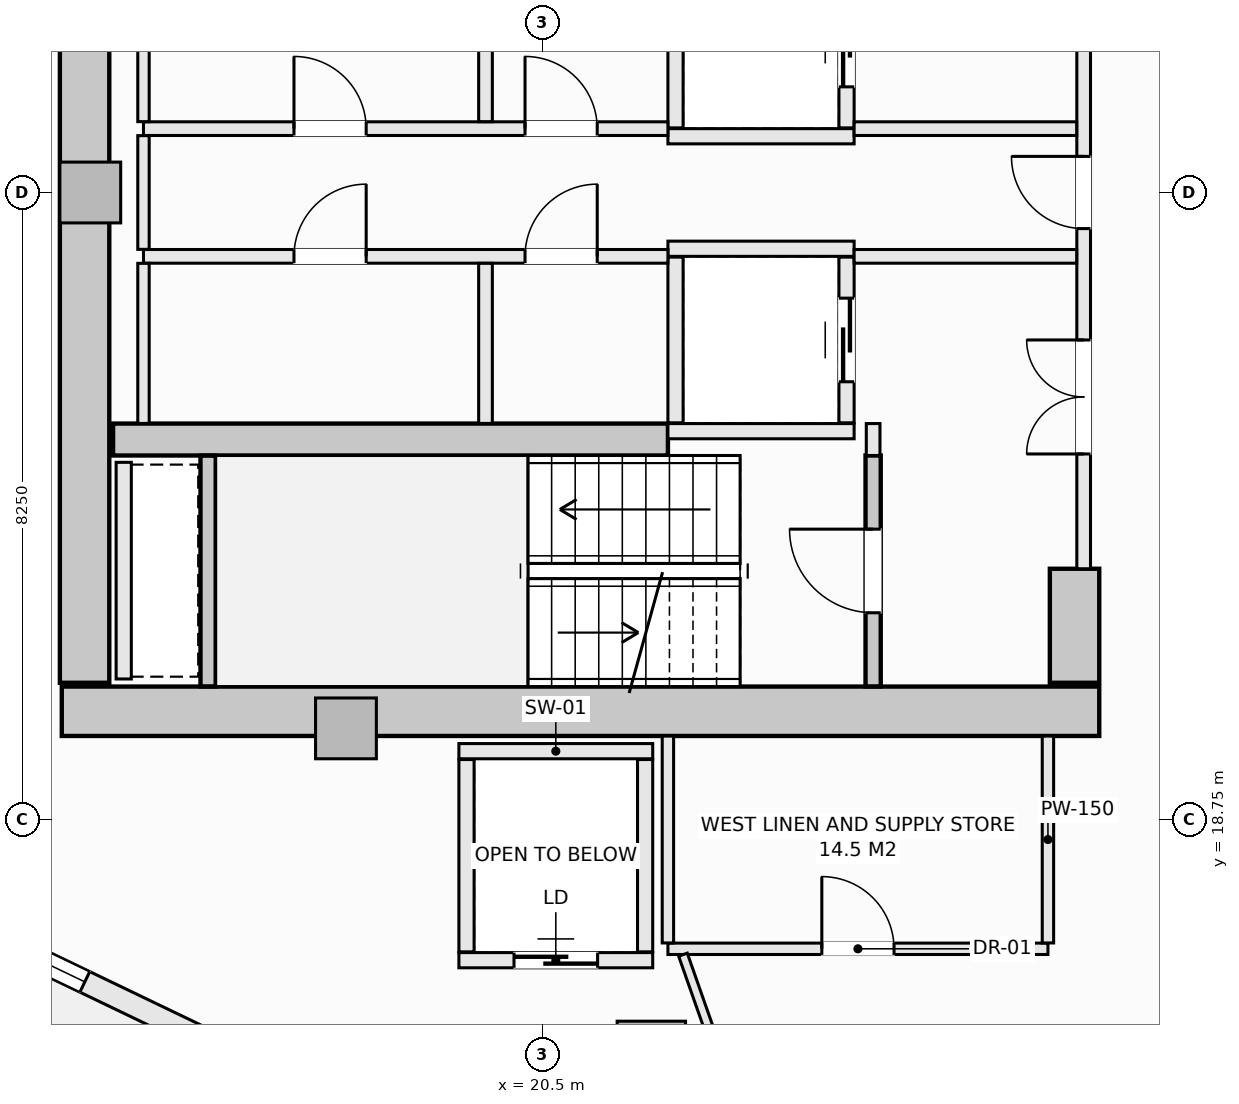
"""IFC4 building model, lengths in metres.
Left out: names, types, materials, properties, quantities, classifications, styles, units other than length and angle.
Written with IfcOpenShell. Run it as: python <this file> out.ifc"""

import sys

from ifc_helpers import new_model, si_unit, direction, frame, frame_2d, origin, origin_2d, place, context, subcontext, project, spatial, rectangle, extrude, element, fill, save


model = new_model("IFC4")
c1 = context("Model", 3, precision=1e-05, world=origin(), true_north=direction((0.0, 1.0)))
c2 = subcontext(c1, "Body", "Model", "MODEL_VIEW")
j1 = project(units=[si_unit("LENGTHUNIT", "METRE"), si_unit("PLANEANGLEUNIT", "RADIAN")], contexts=[c1])
p1 = place(None, origin())
s1 = spatial("IfcSite", under=j1, at=p1, CompositionType="ELEMENT")
p2 = place(p1, origin())
s2 = spatial("IfcBuilding", under=s1, at=p2, CompositionType="ELEMENT")
p3 = place(p2, frame((0.0, 0.0, 142.7)))
s3 = spatial("IfcBuildingStorey", under=s2, at=p3, CompositionType="ELEMENT", Elevation=142.7)
p4 = place(p3, frame((14.175, 20.175, -0.27), z_axis=(0.0, 0.0, 1.0), x_axis=(1.0, 0.0, 0.0)))
e1 = element("IfcWall", 1, at=p4, inside=s3, PredefinedType="SHEAR", context=c2, shape_type="SweptSolid", body=[
    extrude(rectangle(XDim=13.65, YDim=0.65, at=frame_2d((6.825, 0.0))), origin(), (0.0, 0.0, 1.0), 3.4),
])
p5 = place(p3, frame((14.475, 20.55, -0.27), z_axis=(0.0, 0.0, 1.0), x_axis=(0.0, 1.0, 0.0)))
e2 = element("IfcWall", 2, at=p5, inside=s3, PredefinedType="SHEAR", context=c2, shape_type="SweptSolid", body=[
    extrude(rectangle(XDim=12.9, YDim=0.65, at=frame_2d((6.45, 0.0))), origin(), (0.0, 0.0, 1.0), 3.4),
])
p6 = place(p3, frame((27.5, 20.55, -0.27), z_axis=(0.0, 0.0, 1.0), x_axis=(0.0, 1.0, 0.0)))
e3 = element("IfcWall", 3, at=p6, inside=s3, PredefinedType="SHEAR", context=c2, shape_type="SweptSolid", body=[
    extrude(rectangle(XDim=1.5, YDim=0.65, at=frame_2d((0.75, 0.0))), origin(), (0.0, 0.0, 1.0), 3.4),
])
p7 = place(p3, frame((14.85, 23.75, -0.27), z_axis=(0.0, 0.0, 1.0), x_axis=(1.0, 0.0, 0.0)))
e4 = element("IfcWall", 4, at=p7, inside=s3, PredefinedType="SHEAR", context=c2, shape_type="SweptSolid", body=[
    extrude(rectangle(XDim=7.3, YDim=0.42, at=frame_2d((3.65, 0.0))), origin(), (0.0, 0.0, 1.0), 3.4),
])
p8 = place(p3, frame((21.932, 15.648, -0.27), z_axis=(0.0, 0.0, 1.0), x_axis=(1.0, 0.0, 0.0)))
e5 = element("IfcColumn", 5, at=p8, inside=s3, PredefinedType="COLUMN", context=c2, shape_type="SweptSolid", body=[
    extrude(rectangle(XDim=0.9, YDim=0.9, at=origin_2d()), origin(), (0.0, 0.0, 1.0), 3.4),
])
for number, where, z_axis, x_axis in (
    (6, (14.55, 27.0, -0.27), (0.0, 0.0, 1.0), (1.0, 0.0, 0.0)),
    (7, (17.914, 19.95, -0.27), (0.0, 0.0, 1.0), (1.0, 0.0, 0.0)),
):
    element("IfcColumn", number, at=place(p3, frame(where, z_axis=z_axis, x_axis=x_axis)), inside=s3, PredefinedType="PILASTER", context=c2, shape_type="SweptSolid", body=[
        extrude(rectangle(XDim=0.8, YDim=0.8, at=origin_2d()), origin(), (0.0, 0.0, 1.0), 3.4),
    ])
p9 = place(p3, frame((11.127, 18.225, 0.0), z_axis=(0.0, 0.0, 1.0), x_axis=(0.901353070301, -0.433085029363, 0.0)))
e8 = element("IfcWall", 8, at=p9, inside=s3, PredefinedType="SOLIDWALL", context=c2, shape_type="SweptSolid", body=[
    extrude(rectangle(XDim=5.336, YDim=0.3, at=frame_2d((2.668, 0.0))), origin(), (0.0, 0.0, 1.0), 2.653),
])
p10 = place(p9, frame((1.618, 0.0, 0.74)))
e9 = element("IfcOpeningElement", 9, at=p10, cuts=e8, PredefinedType="OPENING", context=c2, shape_type="SweptSolid", body=[
    extrude(rectangle(XDim=2.1, YDim=1.7, at=frame_2d((1.05, 0.85))), frame((0.0, 0.16, 0.0), z_axis=(0.0, -1.0, 0.0), x_axis=(1.0, 0.0, 0.0)), (0.0, 0.0, 1.0), 0.32),
])
p11 = place(p3, frame((24.85, 20.502, -0.27), z_axis=(0.0, 0.0, 1.0), x_axis=(0.0, 1.0, 0.0)))
e10 = element("IfcWall", 10, at=p11, inside=s3, PredefinedType="SHEAR", context=c2, shape_type="SweptSolid", body=[
    extrude(rectangle(XDim=3.038, YDim=0.2, at=frame_2d((1.519, 0.0))), origin(), (0.0, 0.0, 1.0), 3.4),
])
p12 = place(p11, frame((0.969, 0.0, 0.27)))
e11 = element("IfcOpeningElement", 11, at=p12, cuts=e10, PredefinedType="OPENING", context=c2, shape_type="SweptSolid", body=[
    extrude(rectangle(XDim=1.1, YDim=2.15, at=frame_2d((0.55, 1.075))), frame((0.0, 0.11, 0.0), z_axis=(0.0, -1.0, 0.0), x_axis=(1.0, 0.0, 0.0)), (0.0, 0.0, 1.0), 0.22),
])
p13 = place(p3, frame((16.1, 20.502, -0.27), z_axis=(0.0, 0.0, 1.0), x_axis=(0.0, 1.0, 0.0)))
e12 = element("IfcWall", 12, at=p13, inside=s3, PredefinedType="SHEAR", context=c2, shape_type="SweptSolid", body=[
    extrude(rectangle(XDim=3.036, YDim=0.2, at=frame_2d((1.518, 0.0))), origin(), (0.0, 0.0, 1.0), 3.4),
])
p14 = place(p3, frame((22.15, 27.74, 0.0), z_axis=(0.0, 0.0, 1.0), x_axis=(1.0, 0.0, 0.0)))
e13 = element("IfcWall", 13, at=p14, inside=s3, PredefinedType="SOLIDWALL", context=c2, shape_type="SweptSolid", body=[
    extrude(rectangle(XDim=2.45, YDim=0.2, at=frame_2d((1.225, 0.0))), origin(), (0.0, 0.0, 1.0), 3.13),
])
p15 = place(p3, frame((22.25, 27.85, 0.0), z_axis=(0.0, 0.0, 1.0), x_axis=(0.0, 1.0, 0.0)))
e14 = element("IfcWall", 14, at=p15, inside=s3, PredefinedType="SOLIDWALL", context=c2, shape_type="SweptSolid", body=[
    extrude(rectangle(XDim=2.18, YDim=0.2, at=frame_2d((1.09, 0.0))), origin(), (0.0, 0.0, 1.0), 3.13),
])
p16 = place(p3, frame((24.5, 27.85, 0.0), z_axis=(0.0, 0.0, 1.0), x_axis=(0.0, 1.0, 0.0)))
e15 = element("IfcWall", 15, at=p16, inside=s3, PredefinedType="SOLIDWALL", context=c2, shape_type="SweptSolid", body=[
    extrude(rectangle(XDim=2.18, YDim=0.2, at=frame_2d((1.09, 0.0))), origin(), (0.0, 0.0, 1.0), 3.13),
])
p17 = place(p16, frame((0.54, 0.0, 0.0)))
e16 = element("IfcOpeningElement", 16, at=p17, cuts=e15, PredefinedType="OPENING", context=c2, shape_type="SweptSolid", body=[
    extrude(rectangle(XDim=1.1, YDim=2.2, at=frame_2d((0.55, 1.1))), frame((0.0, 0.11, 0.0), z_axis=(0.0, -1.0, 0.0), x_axis=(1.0, 0.0, 0.0)), (0.0, 0.0, 1.0), 0.22),
])
for number, where, z_axis, x_axis in (
    (17, (22.15, 26.26, 0.0), (0.0, 0.0, 1.0), (1.0, 0.0, 0.0)),
    (18, (22.15, 23.86, 0.0), (0.0, 0.0, 1.0), (1.0, 0.0, 0.0)),
):
    element("IfcWall", number, at=place(p3, frame(where, z_axis=z_axis, x_axis=x_axis)), inside=s3, PredefinedType="SOLIDWALL", context=c2, shape_type="SweptSolid", body=[
        extrude(rectangle(XDim=2.45, YDim=0.2, at=frame_2d((1.225, 0.0))), origin(), (0.0, 0.0, 1.0), 3.13),
    ])
p18 = place(p3, frame((22.25, 23.97, 0.0), z_axis=(0.0, 0.0, 1.0), x_axis=(0.0, 1.0, 0.0)))
e19 = element("IfcWall", 19, at=p18, inside=s3, PredefinedType="SOLIDWALL", context=c2, shape_type="SweptSolid", body=[
    extrude(rectangle(XDim=2.18, YDim=0.2, at=frame_2d((1.09, 0.0))), origin(), (0.0, 0.0, 1.0), 3.13),
])
p19 = place(p3, frame((24.5, 23.97, 0.0), z_axis=(0.0, 0.0, 1.0), x_axis=(0.0, 1.0, 0.0)))
e20 = element("IfcWall", 20, at=p19, inside=s3, PredefinedType="SOLIDWALL", context=c2, shape_type="SweptSolid", body=[
    extrude(rectangle(XDim=2.18, YDim=0.2, at=frame_2d((1.09, 0.0))), origin(), (0.0, 0.0, 1.0), 3.13),
])
p20 = place(p19, frame((0.54, 0.0, 0.0)))
e21 = element("IfcOpeningElement", 21, at=p20, cuts=e20, PredefinedType="OPENING", context=c2, shape_type="SweptSolid", body=[
    extrude(rectangle(XDim=1.1, YDim=2.2, at=frame_2d((0.55, 1.1))), frame((0.0, 0.11, 0.0), z_axis=(0.0, -1.0, 0.0), x_axis=(1.0, 0.0, 0.0)), (0.0, 0.0, 1.0), 0.22),
])
p21 = place(p3, frame((19.4, 19.65, 0.0), z_axis=(0.0, 0.0, 1.0), x_axis=(1.0, 0.0, 0.0)))
e22 = element("IfcWall", 22, at=p21, inside=s3, PredefinedType="SOLIDWALL", context=c2, shape_type="SweptSolid", body=[
    extrude(rectangle(XDim=2.55, YDim=0.2, at=frame_2d((1.275, 0.0))), origin(), (0.0, 0.0, 1.0), 3.13),
])
p22 = place(p3, frame((19.4, 16.9, 0.0), z_axis=(0.0, 0.0, 1.0), x_axis=(1.0, 0.0, 0.0)))
e23 = element("IfcWall", 23, at=p22, inside=s3, PredefinedType="SOLIDWALL", context=c2, shape_type="SweptSolid", body=[
    extrude(rectangle(XDim=2.55, YDim=0.2, at=frame_2d((1.275, 0.0))), origin(), (0.0, 0.0, 1.0), 3.13),
])
p23 = place(p22, frame((0.725, 0.0, 0.0)))
e24 = element("IfcOpeningElement", 24, at=p23, cuts=e23, PredefinedType="OPENING", context=c2, shape_type="SweptSolid", body=[
    extrude(rectangle(XDim=1.1, YDim=2.2, at=frame_2d((0.55, 1.1))), frame((0.0, 0.11, 0.0), z_axis=(0.0, -1.0, 0.0), x_axis=(1.0, 0.0, 0.0)), (0.0, 0.0, 1.0), 0.22),
])
for number, where, z_axis, x_axis in (
    (25, (19.5, 17.01, 0.0), (0.0, 0.0, 1.0), (0.0, 1.0, 0.0)),
    (26, (21.85, 17.01, 0.0), (0.0, 0.0, 1.0), (0.0, 1.0, 0.0)),
):
    element("IfcWall", number, at=place(p3, frame(where, z_axis=z_axis, x_axis=x_axis)), inside=s3, PredefinedType="SOLIDWALL", context=c2, shape_type="SweptSolid", body=[
        extrude(rectangle(XDim=2.53, YDim=0.2, at=frame_2d((1.265, 0.0))), origin(), (0.0, 0.0, 1.0), 3.13),
    ])
p24 = place(p3, frame((14.99, 20.6, 0.0), z_axis=(0.0, 0.0, 1.0), x_axis=(0.0, 1.0, 0.0)))
e27 = element("IfcWall", 27, at=p24, inside=s3, PredefinedType="SOLIDWALL", context=c2, shape_type="SweptSolid", body=[
    extrude(rectangle(XDim=2.85, YDim=0.2, at=frame_2d((1.425, 0.0))), origin(), (0.0, 0.0, 1.0), 3.13),
])
p25 = place(p3, frame((24.85, 23.54, 0.0), z_axis=(0.0, 0.0, 1.0), x_axis=(0.0, 1.0, 0.0)))
e28 = element("IfcWall", 28, at=p25, inside=s3, PredefinedType="SOLIDWALL", context=c2, shape_type="SweptSolid", body=[
    extrude(rectangle(XDim=0.42, YDim=0.18, at=frame_2d((0.21, 0.0))), origin(), (0.0, 0.0, 1.0), 3.13),
])
p26 = place(p3, frame((27.62, 22.05, 0.0), z_axis=(0.0, 0.0, 1.0), x_axis=(0.0, 1.0, 0.0)))
e29 = element("IfcWall", 29, at=p26, inside=s3, PredefinedType="SOLIDWALL", context=c2, shape_type="SweptSolid", body=[
    extrude(rectangle(XDim=9.9, YDim=0.18, at=frame_2d((4.95, 0.0))), origin(), (0.0, 0.0, 1.0), 3.13),
])
p27 = place(p26, frame((4.475, 0.0, 0.0)))
e30 = element("IfcOpeningElement", 30, at=p27, cuts=e29, PredefinedType="OPENING", context=c2, shape_type="SweptSolid", body=[
    extrude(rectangle(XDim=0.95, YDim=2.1, at=frame_2d((0.475, 1.05))), frame((0.0, 0.1, 0.0), z_axis=(0.0, -1.0, 0.0), x_axis=(1.0, 0.0, 0.0)), (0.0, 0.0, 1.0), 0.2),
])
p28 = place(p26, frame((6.89, 0.0, 0.0)))
e31 = element("IfcOpeningElement", 31, at=p28, cuts=e29, PredefinedType="OPENING", context=c2, shape_type="SweptSolid", body=[
    extrude(rectangle(XDim=1.5, YDim=2.2, at=frame_2d((0.75, 1.1))), frame((0.0, 0.1, 0.0), z_axis=(0.0, -1.0, 0.0), x_axis=(1.0, 0.0, 0.0)), (0.0, 0.0, 1.0), 0.2),
])
p29 = place(p26, frame((1.51, 0.0, 0.0)))
e32 = element("IfcOpeningElement", 32, at=p29, cuts=e29, PredefinedType="OPENING", context=c2, shape_type="SweptSolid", body=[
    extrude(rectangle(XDim=1.5, YDim=2.2, at=frame_2d((0.75, 1.1))), frame((0.0, 0.1, 0.0), z_axis=(0.0, -1.0, 0.0), x_axis=(1.0, 0.0, 0.0)), (0.0, 0.0, 1.0), 0.2),
])
p30 = place(p3, frame((15.25, 27.84, 0.0), z_axis=(0.0, 0.0, 1.0), x_axis=(1.0, 0.0, 0.0)))
e33 = element("IfcWall", 33, at=p30, inside=s3, PredefinedType="SOLIDWALL", context=c2, shape_type="SweptSolid", body=[
    extrude(rectangle(XDim=6.9, YDim=0.18, at=frame_2d((3.45, 0.0))), origin(), (0.0, 0.0, 1.0), 3.13),
])
p31 = place(p30, frame((5.02, 0.0, 0.0)))
e34 = element("IfcOpeningElement", 34, at=p31, cuts=e33, PredefinedType="OPENING", context=c2, shape_type="SweptSolid", body=[
    extrude(rectangle(XDim=0.95, YDim=2.1, at=frame_2d((0.475, 1.05))), frame((0.0, 0.1, 0.0), z_axis=(0.0, -1.0, 0.0), x_axis=(1.0, 0.0, 0.0)), (0.0, 0.0, 1.0), 0.2),
])
p32 = place(p30, frame((1.98, 0.0, 0.0)))
e35 = element("IfcOpeningElement", 35, at=p32, cuts=e33, PredefinedType="OPENING", context=c2, shape_type="SweptSolid", body=[
    extrude(rectangle(XDim=0.95, YDim=2.1, at=frame_2d((0.475, 1.05))), frame((0.0, 0.1, 0.0), z_axis=(0.0, -1.0, 0.0), x_axis=(1.0, 0.0, 0.0)), (0.0, 0.0, 1.0), 0.2),
])
p33 = place(p3, frame((24.6, 27.84, 0.0), z_axis=(0.0, 0.0, 1.0), x_axis=(1.0, 0.0, 0.0)))
e36 = element("IfcWall", 36, at=p33, inside=s3, PredefinedType="SOLIDWALL", context=c2, shape_type="SweptSolid", body=[
    extrude(rectangle(XDim=2.928, YDim=0.18, at=frame_2d((1.464, 0.0))), origin(), (0.0, 0.0, 1.0), 3.13),
])
p34 = place(p3, frame((15.25, 26.16, 0.0), z_axis=(0.0, 0.0, 1.0), x_axis=(1.0, 0.0, 0.0)))
e37 = element("IfcWall", 37, at=p34, inside=s3, PredefinedType="SOLIDWALL", context=c2, shape_type="SweptSolid", body=[
    extrude(rectangle(XDim=6.9, YDim=0.18, at=frame_2d((3.45, 0.0))), origin(), (0.0, 0.0, 1.0), 3.13),
])
p35 = place(p34, frame((5.02, 0.0, 0.0)))
e38 = element("IfcOpeningElement", 38, at=p35, cuts=e37, PredefinedType="OPENING", context=c2, shape_type="SweptSolid", body=[
    extrude(rectangle(XDim=0.95, YDim=2.1, at=frame_2d((0.475, 1.05))), frame((0.0, 0.1, 0.0), z_axis=(0.0, -1.0, 0.0), x_axis=(1.0, 0.0, 0.0)), (0.0, 0.0, 1.0), 0.2),
])
p36 = place(p34, frame((1.98, 0.0, 0.0)))
e39 = element("IfcOpeningElement", 39, at=p36, cuts=e37, PredefinedType="OPENING", context=c2, shape_type="SweptSolid", body=[
    extrude(rectangle(XDim=0.95, YDim=2.1, at=frame_2d((0.475, 1.05))), frame((0.0, 0.1, 0.0), z_axis=(0.0, -1.0, 0.0), x_axis=(1.0, 0.0, 0.0)), (0.0, 0.0, 1.0), 0.2),
])
p37 = place(p3, frame((24.6, 26.16, 0.0), z_axis=(0.0, 0.0, 1.0), x_axis=(1.0, 0.0, 0.0)))
e40 = element("IfcWall", 40, at=p37, inside=s3, PredefinedType="SOLIDWALL", context=c2, shape_type="SweptSolid", body=[
    extrude(rectangle(XDim=2.928, YDim=0.18, at=frame_2d((1.464, 0.0))), origin(), (0.0, 0.0, 1.0), 3.13),
])
p38 = place(p3, frame((15.25, 23.962, 0.0), z_axis=(0.0, 0.0, 1.0), x_axis=(0.0, 1.0, 0.0)))
e41 = element("IfcWall", 41, at=p38, inside=s3, PredefinedType="PARTITIONING", context=c2, shape_type="SweptSolid", body=[
    extrude(rectangle(XDim=2.106, YDim=0.15, at=frame_2d((1.053, 0.0))), origin(), (0.0, 0.0, 1.0), 3.13),
])
p39 = place(p3, frame((15.25, 26.252, 0.0), z_axis=(0.0, 0.0, 1.0), x_axis=(0.0, 1.0, 0.0)))
e42 = element("IfcWall", 42, at=p39, inside=s3, PredefinedType="PARTITIONING", context=c2, shape_type="SweptSolid", body=[
    extrude(rectangle(XDim=1.496, YDim=0.15, at=frame_2d((0.748, 0.0))), origin(), (0.0, 0.0, 1.0), 3.13),
])
p40 = place(p3, frame((15.25, 27.932, 0.0), z_axis=(0.0, 0.0, 1.0), x_axis=(0.0, 1.0, 0.0)))
e43 = element("IfcWall", 43, at=p40, inside=s3, PredefinedType="PARTITIONING", context=c2, shape_type="SweptSolid", body=[
    extrude(rectangle(XDim=2.106, YDim=0.15, at=frame_2d((1.053, 0.0))), origin(), (0.0, 0.0, 1.0), 3.13),
])
for number, where, z_axis, x_axis in (
    (44, (19.75, 23.962, 0.0), (0.0, 0.0, 1.0), (0.0, 1.0, 0.0)),
    (45, (19.75, 27.932, 0.0), (0.0, 0.0, 1.0), (0.0, 1.0, 0.0)),
):
    element("IfcWall", number, at=place(p3, frame(where, z_axis=z_axis, x_axis=x_axis)), inside=s3, PredefinedType="SOLIDWALL", context=c2, shape_type="SweptSolid", body=[
        extrude(rectangle(XDim=2.106, YDim=0.18, at=frame_2d((1.053, 0.0))), origin(), (0.0, 0.0, 1.0), 3.13),
    ])
p41 = place(p3, frame((22.15, 17.05, 0.0), z_axis=(0.0, 0.0, 1.0), x_axis=(1.0, 0.0, 0.0)))
e46 = element("IfcWall", 46, at=p41, inside=s3, PredefinedType="PARTITIONING", context=c2, shape_type="SweptSolid", body=[
    extrude(rectangle(XDim=5.0, YDim=0.15, at=frame_2d((2.5, 0.0))), origin(), (0.0, 0.0, 1.0), 3.13),
])
p42 = place(p41, frame((2.025, 0.0, 0.0)))
e47 = element("IfcOpeningElement", 47, at=p42, cuts=e46, PredefinedType="OPENING", context=c2, shape_type="SweptSolid", body=[
    extrude(rectangle(XDim=0.95, YDim=2.1, at=frame_2d((0.475, 1.05))), frame((0.0, 0.085, 0.0), z_axis=(0.0, -1.0, 0.0), x_axis=(1.0, 0.0, 0.0)), (0.0, 0.0, 1.0), 0.17),
])
for number, where, z_axis, x_axis in (
    (48, (22.15, 17.127, 0.0), (0.0, 0.0, 1.0), (0.0, 1.0, 0.0)),
    (49, (27.15, 17.127, 0.0), (0.0, 0.0, 1.0), (0.0, 1.0, 0.0)),
):
    element("IfcWall", number, at=place(p3, frame(where, z_axis=z_axis, x_axis=x_axis)), inside=s3, PredefinedType="PARTITIONING", context=c2, shape_type="SweptSolid", body=[
        extrude(rectangle(XDim=2.721, YDim=0.15, at=frame_2d((1.36, 0.0))), origin(), (0.0, 0.0, 1.0), 3.13),
    ])
p43 = place(p3, frame((22.348, 16.973, 0.0), z_axis=(0.0, 0.0, 1.0), x_axis=(0.331471687044, -0.943465166653, 0.0)))
e50 = element("IfcWall", 50, at=p43, inside=s3, PredefinedType="PARTITIONING", context=c2, shape_type="SweptSolid", body=[
    extrude(rectangle(XDim=1.231, YDim=0.12, at=frame_2d((0.616, 0.0))), origin(), (0.0, 0.0, 1.0), 3.13),
])
p44 = place(p10, origin())
e51 = element("IfcWindow", 51, at=p44, inside=s3, PartitioningType="SINGLE_PANEL", PredefinedType="WINDOW", context=c2, shape_type="SweptSolid", body=[
    extrude(rectangle(XDim=2.1, YDim=1.7, at=frame_2d((1.05, 0.85))), frame((0.0, 0.03, 0.0), z_axis=(0.0, -1.0, 0.0), x_axis=(1.0, 0.0, 0.0)), (0.0, 0.0, 1.0), 0.06),
])
fill(e9, e51)
p45 = place(p12, origin())
e52 = element("IfcDoor", 52, at=p45, inside=s3, OperationType="SINGLE_SWING_RIGHT", PredefinedType="DOOR", context=c2, shape_type="SweptSolid", body=[
    extrude(rectangle(XDim=1.1, YDim=2.15, at=frame_2d((0.55, 1.075))), frame((0.0, 0.025, 0.0), z_axis=(0.0, -1.0, 0.0), x_axis=(1.0, 0.0, 0.0)), (0.0, 0.0, 1.0), 0.05),
])
fill(e11, e52)
p46 = place(p17, origin())
e53 = element("IfcDoor", 53, at=p46, inside=s3, OperationType="SLIDING_TO_LEFT", PredefinedType="DOOR", context=c2, shape_type="SweptSolid", body=[
    extrude(rectangle(XDim=1.1, YDim=2.2, at=frame_2d((0.55, 1.1))), frame((0.0, 0.025, 0.0), z_axis=(0.0, -1.0, 0.0), x_axis=(1.0, 0.0, 0.0)), (0.0, 0.0, 1.0), 0.05),
])
fill(e16, e53)
p47 = place(p20, origin())
e54 = element("IfcDoor", 54, at=p47, inside=s3, OperationType="SLIDING_TO_LEFT", PredefinedType="DOOR", context=c2, shape_type="SweptSolid", body=[
    extrude(rectangle(XDim=1.1, YDim=2.2, at=frame_2d((0.55, 1.1))), frame((0.0, 0.025, 0.0), z_axis=(0.0, -1.0, 0.0), x_axis=(1.0, 0.0, 0.0)), (0.0, 0.0, 1.0), 0.05),
])
fill(e21, e54)
p48 = place(p23, origin())
e55 = element("IfcDoor", 55, at=p48, inside=s3, OperationType="SLIDING_TO_LEFT", PredefinedType="DOOR", context=c2, shape_type="SweptSolid", body=[
    extrude(rectangle(XDim=1.1, YDim=2.2, at=frame_2d((0.55, 1.1))), frame((0.0, 0.025, 0.0), z_axis=(0.0, -1.0, 0.0), x_axis=(1.0, 0.0, 0.0)), (0.0, 0.0, 1.0), 0.05),
])
fill(e24, e55)
p49 = place(p27, origin())
e56 = element("IfcDoor", 56, at=p49, inside=s3, OperationType="SINGLE_SWING_RIGHT", PredefinedType="DOOR", context=c2, shape_type="SweptSolid", body=[
    extrude(rectangle(XDim=0.95, YDim=2.1, at=frame_2d((0.475, 1.05))), frame((0.0, 0.025, 0.0), z_axis=(0.0, -1.0, 0.0), x_axis=(1.0, 0.0, 0.0)), (0.0, 0.0, 1.0), 0.05),
])
fill(e30, e56)
p50 = place(p29, origin())
e57 = element("IfcDoor", 57, at=p50, inside=s3, OperationType="DOUBLE_DOOR_SINGLE_SWING", PredefinedType="DOOR", context=c2, shape_type="SweptSolid", body=[
    extrude(rectangle(XDim=1.5, YDim=2.2, at=frame_2d((0.75, 1.1))), frame((0.0, 0.025, 0.0), z_axis=(0.0, -1.0, 0.0), x_axis=(1.0, 0.0, 0.0)), (0.0, 0.0, 1.0), 0.05),
])
fill(e32, e57)
p51 = place(p31, origin())
e58 = element("IfcDoor", 58, at=p51, inside=s3, OperationType="SINGLE_SWING_LEFT", PredefinedType="DOOR", context=c2, shape_type="SweptSolid", body=[
    extrude(rectangle(XDim=0.95, YDim=2.1, at=frame_2d((0.475, 1.05))), frame((0.0, 0.025, 0.0), z_axis=(0.0, -1.0, 0.0), x_axis=(1.0, 0.0, 0.0)), (0.0, 0.0, 1.0), 0.05),
])
fill(e34, e58)
p52 = place(p35, origin())
e59 = element("IfcDoor", 59, at=p52, inside=s3, OperationType="SINGLE_SWING_RIGHT", PredefinedType="DOOR", context=c2, shape_type="SweptSolid", body=[
    extrude(rectangle(XDim=0.95, YDim=2.1, at=frame_2d((0.475, 1.05))), frame((0.0, 0.025, 0.0), z_axis=(0.0, -1.0, 0.0), x_axis=(1.0, 0.0, 0.0)), (0.0, 0.0, 1.0), 0.05),
])
fill(e38, e59)
p53 = place(p32, origin())
e60 = element("IfcDoor", 60, at=p53, inside=s3, OperationType="SINGLE_SWING_LEFT", PredefinedType="DOOR", context=c2, shape_type="SweptSolid", body=[
    extrude(rectangle(XDim=0.95, YDim=2.1, at=frame_2d((0.475, 1.05))), frame((0.0, 0.025, 0.0), z_axis=(0.0, -1.0, 0.0), x_axis=(1.0, 0.0, 0.0)), (0.0, 0.0, 1.0), 0.05),
])
fill(e35, e60)
p54 = place(p36, origin())
e61 = element("IfcDoor", 61, at=p54, inside=s3, OperationType="SINGLE_SWING_RIGHT", PredefinedType="DOOR", context=c2, shape_type="SweptSolid", body=[
    extrude(rectangle(XDim=0.95, YDim=2.1, at=frame_2d((0.475, 1.05))), frame((0.0, 0.025, 0.0), z_axis=(0.0, -1.0, 0.0), x_axis=(1.0, 0.0, 0.0)), (0.0, 0.0, 1.0), 0.05),
])
fill(e39, e61)
p55 = place(p42, origin())
e62 = element("IfcDoor", 62, at=p55, inside=s3, OperationType="SINGLE_SWING_LEFT", PredefinedType="DOOR", context=c2, shape_type="SweptSolid", body=[
    extrude(rectangle(XDim=0.95, YDim=2.1, at=frame_2d((0.475, 1.05))), frame((0.0, 0.025, 0.0), z_axis=(0.0, -1.0, 0.0), x_axis=(1.0, 0.0, 0.0)), (0.0, 0.0, 1.0), 0.05),
])
fill(e47, e62)
save(model, sys.argv[1])
